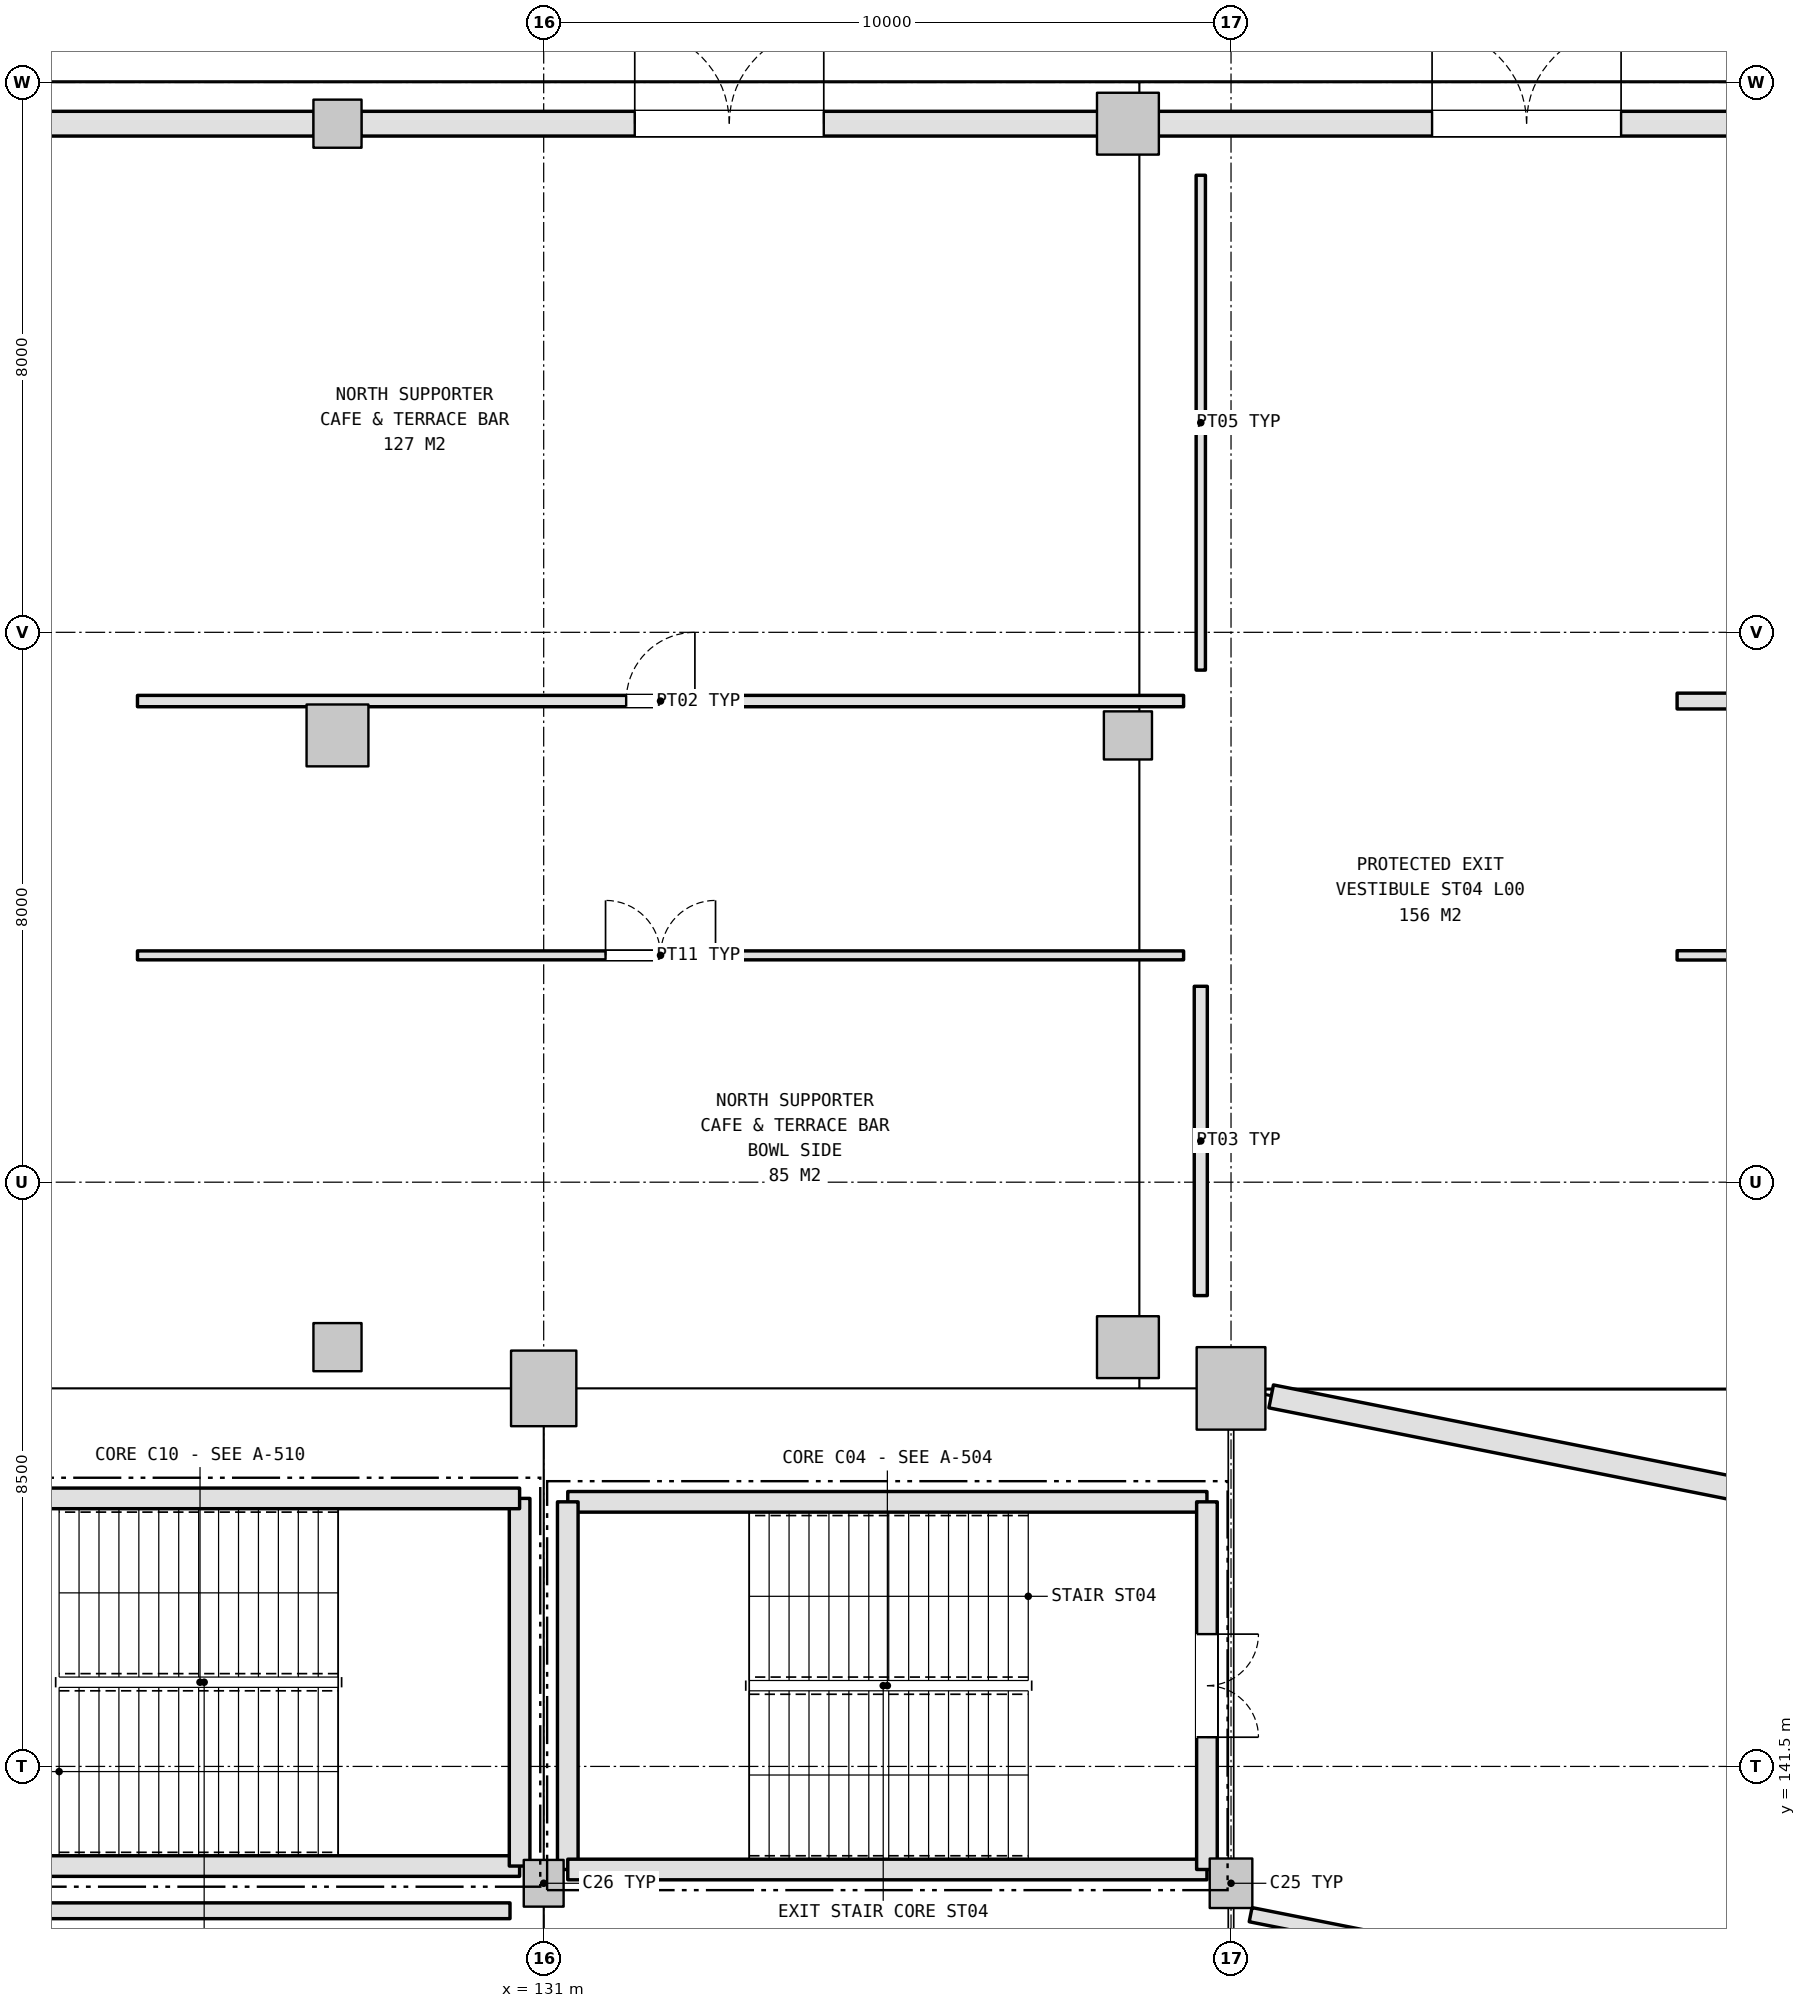
"""IFC4 building model, lengths in metres.
Left out: names, types, materials, properties, quantities, classifications, styles, units other than length and angle.
Written with IfcOpenShell. Run it as: python <this file> out.ifc"""

import sys

from ifc_helpers import new_model, si_unit, direction, frame, frame_2d, origin, origin_2d, place, context, subcontext, project, spatial, rectangle, extrude, element, fill, save


model = new_model("IFC4")
c1 = context("Model", 3, precision=1e-05, world=origin(), true_north=direction((0.0, 1.0)))
c2 = subcontext(c1, "Body", "Model", "MODEL_VIEW")
j1 = project(units=[si_unit("LENGTHUNIT", "METRE"), si_unit("PLANEANGLEUNIT", "RADIAN")], contexts=[c1])
p1 = place(None, origin())
s1 = spatial("IfcSite", under=j1, at=p1, CompositionType="ELEMENT")
p2 = place(p1, origin())
s2 = spatial("IfcBuilding", under=s1, at=p2, CompositionType="ELEMENT")
p3 = place(p2, origin())
s3 = spatial("IfcBuildingStorey", under=s2, at=p3, CompositionType="ELEMENT", Elevation=0.0)
p4 = place(p3, frame((141.0, 139.8, 0.0), z_axis=(0.0, 0.0, 1.0), x_axis=(1.0, 0.0, 0.0)))
e1 = element("IfcColumn", 1, at=p4, inside=s3, PredefinedType="COLUMN", context=c2, shape_type="SweptSolid", body=[
    extrude(rectangle(XDim=0.62, YDim=0.72, at=origin_2d()), origin(), (0.0, 0.0, 1.0), 5.4),
])
p5 = place(p3, frame((141.0, 147.0, 0.0), z_axis=(0.0, 0.0, 1.0), x_axis=(1.0, 0.0, 0.0)))
e2 = element("IfcColumn", 2, at=p5, inside=s3, PredefinedType="COLUMN", context=c2, shape_type="SweptSolid", body=[
    extrude(rectangle(XDim=1.0, YDim=1.2, at=origin_2d()), origin(), (0.0, 0.0, 1.0), 5.4),
])
p6 = place(p3, frame((131.0, 139.8, 0.0), z_axis=(0.0, 0.0, 1.0), x_axis=(1.0, 0.0, 0.0)))
e3 = element("IfcColumn", 3, at=p6, inside=s3, PredefinedType="COLUMN", context=c2, shape_type="SweptSolid", body=[
    extrude(rectangle(XDim=0.58, YDim=0.68, at=origin_2d()), origin(), (0.0, 0.0, 1.0), 5.4),
])
p7 = place(p3, frame((131.0, 147.0, 0.0), z_axis=(0.0, 0.0, 1.0), x_axis=(1.0, 0.0, 0.0)))
e4 = element("IfcColumn", 4, at=p7, inside=s3, PredefinedType="COLUMN", context=c2, shape_type="SweptSolid", body=[
    extrude(rectangle(XDim=0.95, YDim=1.1, at=origin_2d()), origin(), (0.0, 0.0, 1.0), 5.4),
])
p8 = place(p3, frame((128.0, 147.6, 0.0), z_axis=(0.0, 0.0, 1.0), x_axis=(1.0, 0.0, 0.0)))
e5 = element("IfcColumn", 5, at=p8, inside=s3, PredefinedType="COLUMN", context=c2, shape_type="SweptSolid", body=[
    extrude(rectangle(XDim=0.7, YDim=0.7, at=origin_2d()), origin(), (0.0, 0.0, 1.0), 5.4),
])
p9 = place(p3, frame((128.0, 156.5, 0.0), z_axis=(0.0, 0.0, 1.0), x_axis=(1.0, 0.0, 0.0)))
e6 = element("IfcColumn", 6, at=p9, inside=s3, PredefinedType="COLUMN", context=c2, shape_type="SweptSolid", body=[
    extrude(rectangle(XDim=0.9, YDim=0.9, at=origin_2d()), origin(), (0.0, 0.0, 1.0), 5.4),
])
p10 = place(p3, frame((128.0, 165.4, 0.0), z_axis=(0.0, 0.0, 1.0), x_axis=(1.0, 0.0, 0.0)))
e7 = element("IfcColumn", 7, at=p10, inside=s3, PredefinedType="COLUMN", context=c2, shape_type="SweptSolid", body=[
    extrude(rectangle(XDim=0.7, YDim=0.7, at=origin_2d()), origin(), (0.0, 0.0, 1.0), 5.4),
])
p11 = place(p3, frame((139.5, 147.6, 0.0), z_axis=(0.0, 0.0, 1.0), x_axis=(1.0, 0.0, 0.0)))
e8 = element("IfcColumn", 8, at=p11, inside=s3, PredefinedType="COLUMN", context=c2, shape_type="SweptSolid", body=[
    extrude(rectangle(XDim=0.9, YDim=0.9, at=origin_2d()), origin(), (0.0, 0.0, 1.0), 5.4),
])
p12 = place(p3, frame((139.5, 156.5, 0.0), z_axis=(0.0, 0.0, 1.0), x_axis=(1.0, 0.0, 0.0)))
e9 = element("IfcColumn", 9, at=p12, inside=s3, PredefinedType="COLUMN", context=c2, shape_type="SweptSolid", body=[
    extrude(rectangle(XDim=0.7, YDim=0.7, at=origin_2d()), origin(), (0.0, 0.0, 1.0), 5.4),
])
p13 = place(p3, frame((139.5, 165.4, 0.0), z_axis=(0.0, 0.0, 1.0), x_axis=(1.0, 0.0, 0.0)))
e10 = element("IfcColumn", 10, at=p13, inside=s3, PredefinedType="COLUMN", context=c2, shape_type="SweptSolid", body=[
    extrude(rectangle(XDim=0.9, YDim=0.9, at=origin_2d()), origin(), (0.0, 0.0, 1.0), 5.4),
])
p14 = place(p3, frame((160.511, 143.119, 0.0), z_axis=(0.0, 0.0, 1.0), x_axis=(-0.98078547189, 0.195089359346, 0.0)))
e11 = element("IfcWall", 11, at=p14, inside=s3, PredefinedType="SOLIDWALL", context=c2, shape_type="SweptSolid", body=[
    extrude(rectangle(XDim=19.298, YDim=0.34, at=frame_2d((9.649, 0.0))), origin(), (0.0, 0.0, 1.0), 4.275),
])
p15 = place(p14, frame((8.849, 0.0, 2.4)))
e12 = element("IfcOpeningElement", 12, at=p15, cuts=e11, PredefinedType="OPENING", context=c2, shape_type="SweptSolid", body=[
    extrude(rectangle(XDim=1.6, YDim=1.2, at=frame_2d((0.8, 0.6))), frame((0.0, 0.18, 0.0), z_axis=(0.0, -1.0, 0.0), x_axis=(1.0, 0.0, 0.0)), (0.0, 0.0, 1.0), 0.36),
])
p16 = place(p3, frame((116.938, 165.4, 0.0), z_axis=(0.0, 0.0, 1.0), x_axis=(1.0, 0.0, 0.0)))
e13 = element("IfcWall", 13, at=p16, inside=s3, PredefinedType="SOLIDWALL", context=c2, shape_type="SweptSolid", body=[
    extrude(rectangle(XDim=10.724, YDim=0.36, at=frame_2d((5.362, 0.0))), origin(), (0.0, 0.0, 1.0), 4.475),
])
p17 = place(p16, frame((3.987, 0.0, 0.0)))
e14 = element("IfcOpeningElement", 14, at=p17, cuts=e13, PredefinedType="OPENING", context=c2, shape_type="SweptSolid", body=[
    extrude(rectangle(XDim=2.75, YDim=2.4, at=frame_2d((1.375, 1.2))), frame((0.0, 0.19, 0.0), z_axis=(0.0, -1.0, 0.0), x_axis=(1.0, 0.0, 0.0)), (0.0, 0.0, 1.0), 0.38),
])
p18 = place(p3, frame((128.338, 165.4, 0.0), z_axis=(0.0, 0.0, 1.0), x_axis=(1.0, 0.0, 0.0)))
e15 = element("IfcWall", 15, at=p18, inside=s3, PredefinedType="SOLIDWALL", context=c2, shape_type="SweptSolid", body=[
    extrude(rectangle(XDim=10.724, YDim=0.36, at=frame_2d((5.362, 0.0))), origin(), (0.0, 0.0, 1.0), 4.475),
])
p19 = place(p18, frame((3.987, 0.0, 0.0)))
e16 = element("IfcOpeningElement", 16, at=p19, cuts=e15, PredefinedType="OPENING", context=c2, shape_type="SweptSolid", body=[
    extrude(rectangle(XDim=2.75, YDim=2.4, at=frame_2d((1.375, 1.2))), frame((0.0, 0.19, 0.0), z_axis=(0.0, -1.0, 0.0), x_axis=(1.0, 0.0, 0.0)), (0.0, 0.0, 1.0), 0.38),
])
p20 = place(p3, frame((139.938, 165.4, 0.0), z_axis=(0.0, 0.0, 1.0), x_axis=(1.0, 0.0, 0.0)))
e17 = element("IfcWall", 17, at=p20, inside=s3, PredefinedType="SOLIDWALL", context=c2, shape_type="SweptSolid", body=[
    extrude(rectangle(XDim=10.724, YDim=0.36, at=frame_2d((5.362, 0.0))), origin(), (0.0, 0.0, 1.0), 4.475),
])
p21 = place(p20, frame((3.987, 0.0, 0.0)))
e18 = element("IfcOpeningElement", 18, at=p21, cuts=e17, PredefinedType="OPENING", context=c2, shape_type="SweptSolid", body=[
    extrude(rectangle(XDim=2.75, YDim=2.4, at=frame_2d((1.375, 1.2))), frame((0.0, 0.19, 0.0), z_axis=(0.0, -1.0, 0.0), x_axis=(1.0, 0.0, 0.0)), (0.0, 0.0, 1.0), 0.38),
])
p22 = place(p3, frame((140.65, 145.35, 0.0), z_axis=(0.0, 0.0, 1.0), x_axis=(-1.0, 0.0, 0.0)))
e19 = element("IfcWall", 19, at=p22, inside=s3, PredefinedType="SHEAR", context=c2, shape_type="SweptSolid", body=[
    extrude(rectangle(XDim=9.299, YDim=0.3, at=frame_2d((4.65, 0.0))), origin(), (0.0, 0.0, 1.0), 5.14),
])
p23 = place(p3, frame((131.35, 145.35, 0.0), z_axis=(0.0, 0.0, 1.0), x_axis=(0.0, -1.0, 0.0)))
e20 = element("IfcWall", 20, at=p23, inside=s3, PredefinedType="SHEAR", context=c2, shape_type="SweptSolid", body=[
    extrude(rectangle(XDim=5.349, YDim=0.3, at=frame_2d((2.675, 0.0))), origin(), (0.0, 0.0, 1.0), 5.14),
])
p24 = place(p3, frame((131.35, 140.0, 0.0), z_axis=(0.0, 0.0, 1.0), x_axis=(1.0, 0.0, 0.0)))
e21 = element("IfcWall", 21, at=p24, inside=s3, PredefinedType="SHEAR", context=c2, shape_type="SweptSolid", body=[
    extrude(rectangle(XDim=9.299, YDim=0.3, at=frame_2d((4.65, 0.0))), origin(), (0.0, 0.0, 1.0), 5.14),
])
p25 = place(p3, frame((140.65, 140.0, 0.0), z_axis=(0.0, 0.0, 1.0), x_axis=(0.0, 1.0, 0.0)))
e22 = element("IfcWall", 22, at=p25, inside=s3, PredefinedType="SHEAR", context=c2, shape_type="SweptSolid", body=[
    extrude(rectangle(XDim=5.349, YDim=0.3, at=frame_2d((2.675, 0.0))), origin(), (0.0, 0.0, 1.0), 5.14),
])
p26 = place(p25, frame((1.925, 0.0, 0.0)))
e23 = element("IfcOpeningElement", 23, at=p26, cuts=e22, PredefinedType="OPENING", context=c2, shape_type="SweptSolid", body=[
    extrude(rectangle(XDim=1.5, YDim=2.2, at=frame_2d((0.75, 1.1))), frame((0.0, 0.16, 0.0), z_axis=(0.0, -1.0, 0.0), x_axis=(1.0, 0.0, 0.0)), (0.0, 0.0, 1.0), 0.32),
])
p27 = place(p3, frame((121.35, 140.05, 0.0), z_axis=(0.0, 0.0, 1.0), x_axis=(1.0, 0.0, 0.0)))
e24 = element("IfcWall", 24, at=p27, inside=s3, PredefinedType="SHEAR", context=c2, shape_type="SweptSolid", body=[
    extrude(rectangle(XDim=9.299, YDim=0.3, at=frame_2d((4.65, 0.0))), origin(), (0.0, 0.0, 1.0), 5.14),
])
p28 = place(p3, frame((130.65, 140.05, 0.0), z_axis=(0.0, 0.0, 1.0), x_axis=(0.0, 1.0, 0.0)))
e25 = element("IfcWall", 25, at=p28, inside=s3, PredefinedType="SHEAR", context=c2, shape_type="SweptSolid", body=[
    extrude(rectangle(XDim=5.349, YDim=0.3, at=frame_2d((2.675, 0.0))), origin(), (0.0, 0.0, 1.0), 5.14),
])
p29 = place(p3, frame((130.65, 145.4, 0.0), z_axis=(0.0, 0.0, 1.0), x_axis=(-1.0, 0.0, 0.0)))
e26 = element("IfcWall", 26, at=p29, inside=s3, PredefinedType="SHEAR", context=c2, shape_type="SweptSolid", body=[
    extrude(rectangle(XDim=9.299, YDim=0.3, at=frame_2d((4.65, 0.0))), origin(), (0.0, 0.0, 1.0), 5.14),
])
p30 = place(p3, frame((125.09, 153.3, 0.0), z_axis=(0.0, 0.0, 1.0), x_axis=(1.0, 0.0, 0.0)))
e27 = element("IfcWall", 27, at=p30, inside=s3, PredefinedType="PARTITIONING", context=c2, shape_type="SweptSolid", body=[
    extrude(rectangle(XDim=15.22, YDim=0.13, at=frame_2d((7.61, 0.0))), origin(), (0.0, 0.0, 1.0), 4.525),
])
p31 = place(p30, frame((6.81, 0.0, 0.0)))
e28 = element("IfcOpeningElement", 28, at=p31, cuts=e27, PredefinedType="OPENING", context=c2, shape_type="SweptSolid", body=[
    extrude(rectangle(XDim=1.6, YDim=2.2, at=frame_2d((0.8, 1.1))), frame((0.0, 0.075, 0.0), z_axis=(0.0, -1.0, 0.0), x_axis=(1.0, 0.0, 0.0)), (0.0, 0.0, 1.0), 0.15),
])
p32 = place(p3, frame((140.56, 152.85, 0.0), z_axis=(0.0, 0.0, 1.0), x_axis=(0.0, -1.0, 0.0)))
e29 = element("IfcWall", 29, at=p32, inside=s3, PredefinedType="PARTITIONING", context=c2, shape_type="SweptSolid", body=[
    extrude(rectangle(XDim=4.5, YDim=0.19, at=frame_2d((2.25, 0.0))), origin(), (0.0, 0.0, 1.0), 4.675),
])
p33 = place(p3, frame((140.31, 157.0, 0.0), z_axis=(0.0, 0.0, 1.0), x_axis=(-1.0, 0.0, 0.0)))
e30 = element("IfcWall", 30, at=p33, inside=s3, PredefinedType="PARTITIONING", context=c2, shape_type="SweptSolid", body=[
    extrude(rectangle(XDim=15.22, YDim=0.165, at=frame_2d((7.61, 0.0))), origin(), (0.0, 0.0, 1.0), 4.525),
])
p34 = place(p33, frame((7.11, 0.0, 0.0)))
e31 = element("IfcOpeningElement", 31, at=p34, cuts=e30, PredefinedType="OPENING", context=c2, shape_type="SweptSolid", body=[
    extrude(rectangle(XDim=1.0, YDim=2.1, at=frame_2d((0.5, 1.05))), frame((0.0, 0.093, 0.0), z_axis=(0.0, -1.0, 0.0), x_axis=(1.0, 0.0, 0.0)), (0.0, 0.0, 1.0), 0.185),
])
p35 = place(p3, frame((140.56, 164.65, 0.0), z_axis=(0.0, 0.0, 1.0), x_axis=(0.0, -1.0, 0.0)))
e32 = element("IfcWall", 32, at=p35, inside=s3, PredefinedType="PARTITIONING", context=c2, shape_type="SweptSolid", body=[
    extrude(rectangle(XDim=7.2, YDim=0.135, at=frame_2d((3.6, 0.0))), origin(), (0.0, 0.0, 1.0), 4.675),
])
p36 = place(p3, frame((147.49, 153.3, 0.0), z_axis=(0.0, 0.0, 1.0), x_axis=(1.0, 0.0, 0.0)))
e33 = element("IfcWall", 33, at=p36, inside=s3, PredefinedType="PARTITIONING", context=c2, shape_type="SweptSolid", body=[
    extrude(rectangle(XDim=18.76, YDim=0.135, at=frame_2d((9.38, 0.0))), origin(), (0.0, 0.0, 1.0), 4.525),
])
p37 = place(p36, frame((8.855, 0.0, 0.0)))
e34 = element("IfcOpeningElement", 34, at=p37, cuts=e33, PredefinedType="OPENING", context=c2, shape_type="SweptSolid", body=[
    extrude(rectangle(XDim=1.05, YDim=2.2, at=frame_2d((0.525, 1.1))), frame((0.0, 0.077, 0.0), z_axis=(0.0, -1.0, 0.0), x_axis=(1.0, 0.0, 0.0)), (0.0, 0.0, 1.0), 0.155),
])
p38 = place(p3, frame((166.25, 157.0, 0.0), z_axis=(0.0, 0.0, 1.0), x_axis=(-1.0, 0.0, 0.0)))
e35 = element("IfcWall", 35, at=p38, inside=s3, PredefinedType="PLUMBINGWALL", context=c2, shape_type="SweptSolid", body=[
    extrude(rectangle(XDim=18.76, YDim=0.23, at=frame_2d((9.38, 0.0))), origin(), (0.0, 0.0, 1.0), 4.525),
])
p39 = place(p38, frame((8.43, 0.0, 0.0)))
e36 = element("IfcOpeningElement", 36, at=p39, cuts=e35, PredefinedType="OPENING", context=c2, shape_type="SweptSolid", body=[
    extrude(rectangle(XDim=1.9, YDim=2.3, at=frame_2d((0.95, 1.15))), frame((0.0, 0.125, 0.0), z_axis=(0.0, -1.0, 0.0), x_axis=(1.0, 0.0, 0.0)), (0.0, 0.0, 1.0), 0.25),
])
p40 = place(p3, frame((121.45, 139.4, 0.0), z_axis=(0.0, 0.0, 1.0), x_axis=(1.0, 0.0, 0.0)))
e37 = element("IfcWall", 37, at=p40, inside=s3, PredefinedType="PLUMBINGWALL", context=c2, shape_type="SweptSolid", body=[
    extrude(rectangle(XDim=9.06, YDim=0.23, at=frame_2d((4.53, 0.0))), origin(), (0.0, 0.0, 1.0), 5.12),
])
p41 = place(p3, frame((141.285, 139.343, 0.0), z_axis=(0.0, 0.0, 1.0), x_axis=(0.980784295226, -0.195095274771, 0.0)))
e38 = element("IfcWall", 38, at=p41, inside=s3, PredefinedType="PLUMBINGWALL", context=c2, shape_type="SweptSolid", body=[
    extrude(rectangle(XDim=16.742, YDim=0.21, at=frame_2d((8.371, 0.0))), origin(), (0.0, 0.0, 1.0), 4.305),
])
p42 = place(p41, frame((7.896, 0.0, 0.0)))
e39 = element("IfcOpeningElement", 39, at=p42, cuts=e38, PredefinedType="OPENING", context=c2, shape_type="SweptSolid", body=[
    extrude(rectangle(XDim=0.95, YDim=2.15, at=frame_2d((0.475, 1.075))), frame((0.0, 0.115, 0.0), z_axis=(0.0, -1.0, 0.0), x_axis=(1.0, 0.0, 0.0)), (0.0, 0.0, 1.0), 0.23),
])
p43 = place(p19, origin())
e40 = element("IfcDoor", 40, at=p43, inside=s3, OperationType="DOUBLE_DOOR_SINGLE_SWING", PredefinedType="DOOR", context=c2, shape_type="SweptSolid", body=[
    extrude(rectangle(XDim=2.75, YDim=2.4, at=frame_2d((1.375, 1.2))), frame((0.0, 0.025, 0.0), z_axis=(0.0, -1.0, 0.0), x_axis=(1.0, 0.0, 0.0)), (0.0, 0.0, 1.0), 0.05),
])
fill(e16, e40)
p44 = place(p21, origin())
e41 = element("IfcDoor", 41, at=p44, inside=s3, OperationType="DOUBLE_DOOR_SINGLE_SWING", PredefinedType="DOOR", context=c2, shape_type="SweptSolid", body=[
    extrude(rectangle(XDim=2.75, YDim=2.4, at=frame_2d((1.375, 1.2))), frame((0.0, 0.025, 0.0), z_axis=(0.0, -1.0, 0.0), x_axis=(1.0, 0.0, 0.0)), (0.0, 0.0, 1.0), 0.05),
])
fill(e18, e41)
p45 = place(p26, frame((1.5, 0.0, 0.0), z_axis=(0.0, 0.0, 1.0), x_axis=(-1.0, 0.0, 0.0)))
e42 = element("IfcDoor", 42, at=p45, inside=s3, OperationType="DOUBLE_DOOR_SINGLE_SWING", PredefinedType="DOOR", context=c2, shape_type="SweptSolid", body=[
    extrude(rectangle(XDim=1.5, YDim=2.2, at=frame_2d((0.75, 1.1))), frame((0.0, 0.025, 0.0), z_axis=(0.0, -1.0, 0.0), x_axis=(1.0, 0.0, 0.0)), (0.0, 0.0, 1.0), 0.05),
])
fill(e23, e42)
p46 = place(p31, origin())
e43 = element("IfcDoor", 43, at=p46, inside=s3, OperationType="DOUBLE_DOOR_SINGLE_SWING", PredefinedType="DOOR", context=c2, shape_type="SweptSolid", body=[
    extrude(rectangle(XDim=1.6, YDim=2.2, at=frame_2d((0.8, 1.1))), frame((0.0, 0.025, 0.0), z_axis=(0.0, -1.0, 0.0), x_axis=(1.0, 0.0, 0.0)), (0.0, 0.0, 1.0), 0.05),
])
fill(e28, e43)
p47 = place(p34, frame((1.0, 0.0, 0.0), z_axis=(0.0, 0.0, 1.0), x_axis=(-1.0, 0.0, 0.0)))
e44 = element("IfcDoor", 44, at=p47, inside=s3, OperationType="SINGLE_SWING_LEFT", PredefinedType="DOOR", context=c2, shape_type="SweptSolid", body=[
    extrude(rectangle(XDim=1.0, YDim=2.1, at=frame_2d((0.5, 1.05))), frame((0.0, 0.025, 0.0), z_axis=(0.0, -1.0, 0.0), x_axis=(1.0, 0.0, 0.0)), (0.0, 0.0, 1.0), 0.05),
])
fill(e31, e44)
save(model, sys.argv[1])
